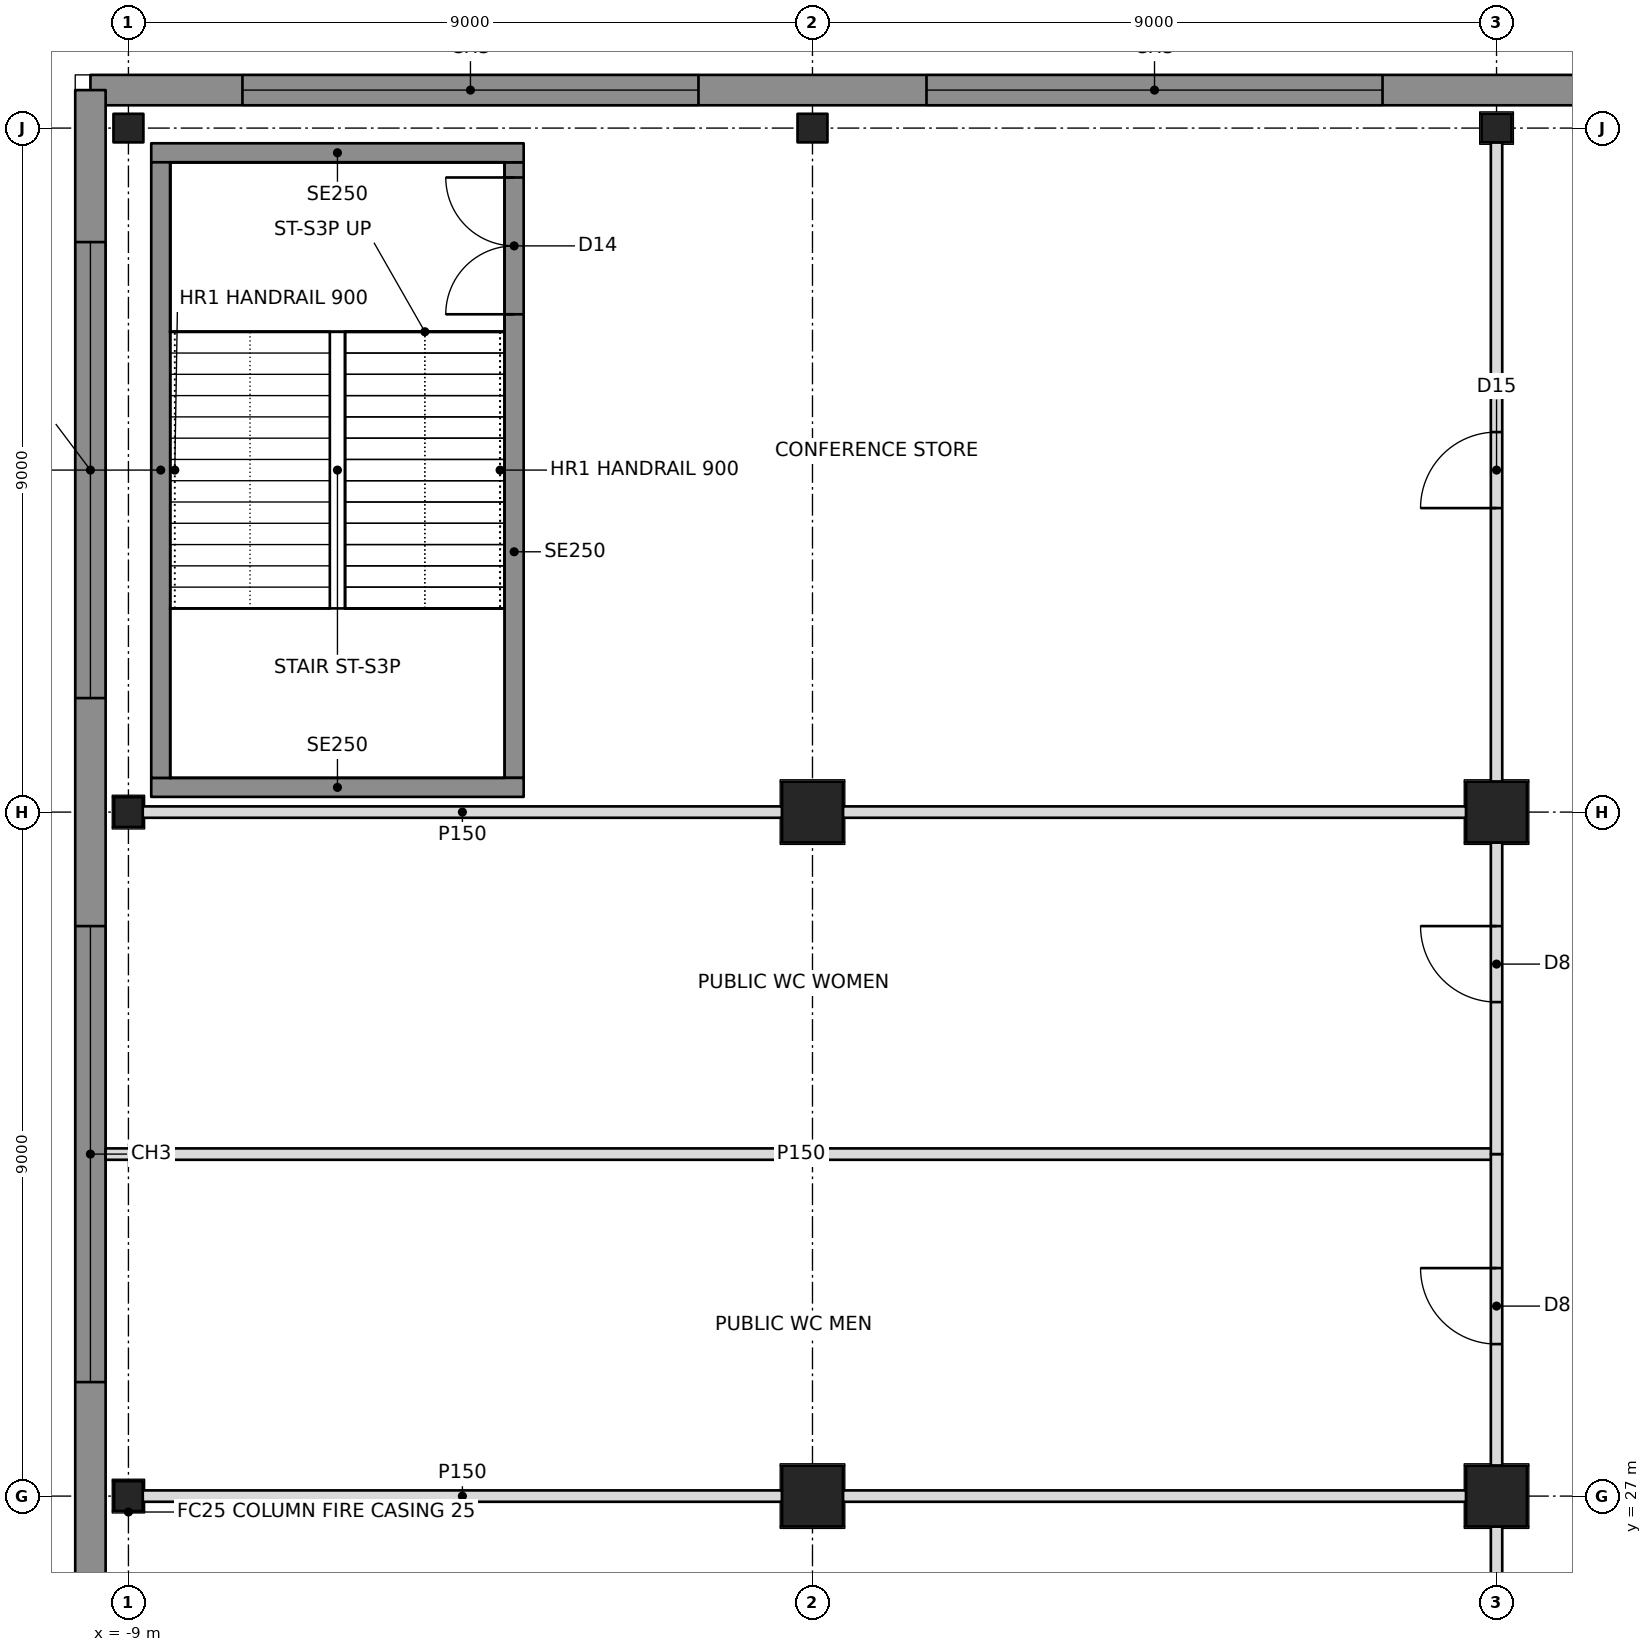
"""IFC4 building model, lengths in metres.
Left out: names, types, materials, properties, quantities, classifications, styles, units other than length and angle.
Written with IfcOpenShell. Run it as: python <this file> out.ifc"""

import sys

from ifc_helpers import new_model, si_unit, direction, frame, frame_2d, origin, origin_2d, place, context, subcontext, project, spatial, rectangle, hollow_rectangle, i_section, extrude, element, fill, save


model = new_model("IFC4")
c1 = context("Model", 3, precision=1e-05, world=origin(), true_north=direction((0.0, 1.0)))
c2 = subcontext(c1, "Body", "Model", "MODEL_VIEW")
j1 = project(units=[si_unit("LENGTHUNIT", "METRE"), si_unit("PLANEANGLEUNIT", "RADIAN")], contexts=[c1])
p1 = place(None, origin())
s1 = spatial("IfcSite", under=j1, at=p1, CompositionType="ELEMENT")
p2 = place(p1, origin())
s2 = spatial("IfcBuilding", under=s1, at=p2, CompositionType="ELEMENT")
p3 = place(p2, frame((0.0, 0.0, 16.0)))
s3 = spatial("IfcBuildingStorey", under=s2, at=p3, CompositionType="ELEMENT", Elevation=16.0)
for number, where, z_axis, x_axis in (
    (1, (-9.0, 27.0, 0.0), (0.0, 0.0, 1.0), (0.0, 1.0, 0.0)),
    (2, (-9.0, 36.0, 0.0), (0.0, 0.0, 1.0), (0.0, 1.0, 0.0)),
    (3, (-9.0, 45.0, 0.0), (0.0, 0.0, 1.0), (1.0, 0.0, 0.0)),
):
    element("IfcColumn", number, at=place(p3, frame(where, z_axis=z_axis, x_axis=x_axis)), inside=s3, PredefinedType="COLUMN", context=c2, shape_type="SweptSolid", body=[
        extrude(i_section(OverallWidth=0.394, OverallDepth=0.376, WebThickness=0.017, FlangeThickness=0.028, at=origin_2d()), origin(), (0.0, 0.0, 1.0), 7.0),
    ])
for number, where, z_axis, x_axis in (
    (4, (0.0, 27.0, 0.0), (0.0, 0.0, 1.0), (0.0, 1.0, 0.0)),
    (5, (0.0, 36.0, 0.0), (0.0, 0.0, 1.0), (1.0, 0.0, 0.0)),
):
    element("IfcColumn", number, at=place(p3, frame(where, z_axis=z_axis, x_axis=x_axis)), inside=s3, PredefinedType="COLUMN", context=c2, shape_type="SweptSolid", body=[
        extrude(hollow_rectangle(XDim=0.8, YDim=0.8, WallThickness=0.1, at=origin_2d()), origin(), (0.0, 0.0, 1.0), 7.0),
    ])
p4 = place(p3, frame((0.0, 45.0, 0.0), z_axis=(0.0, 0.0, 1.0), x_axis=(1.0, 0.0, 0.0)))
e6 = element("IfcColumn", 6, at=p4, inside=s3, PredefinedType="COLUMN", context=c2, shape_type="SweptSolid", body=[
    extrude(i_section(OverallWidth=0.394, OverallDepth=0.376, WebThickness=0.017, FlangeThickness=0.028, at=origin_2d()), origin(), (0.0, 0.0, 1.0), 7.0),
])
for number, where, z_axis, x_axis in (
    (7, (9.0, 27.0, 0.0), (0.0, 0.0, 1.0), (1.0, 0.0, 0.0)),
    (8, (9.0, 36.0, 0.0), (0.0, 0.0, 1.0), (1.0, 0.0, 0.0)),
):
    element("IfcColumn", number, at=place(p3, frame(where, z_axis=z_axis, x_axis=x_axis)), inside=s3, PredefinedType="COLUMN", context=c2, shape_type="SweptSolid", body=[
        extrude(hollow_rectangle(XDim=0.8, YDim=0.8, WallThickness=0.1, at=origin_2d()), origin(), (0.0, 0.0, 1.0), 7.0),
    ])
p5 = place(p3, frame((9.0, 45.0, 0.0), z_axis=(0.0, 0.0, 1.0), x_axis=(1.0, 0.0, 0.0)))
e9 = element("IfcColumn", 9, at=p5, inside=s3, PredefinedType="COLUMN", context=c2, shape_type="SweptSolid", body=[
    extrude(i_section(OverallWidth=0.394, OverallDepth=0.376, WebThickness=0.017, FlangeThickness=0.028, at=origin_2d()), origin(), (0.0, 0.0, 1.0), 7.0),
])
p6 = place(p3, frame((63.5, 45.5, 0.0), z_axis=(0.0, 0.0, 1.0), x_axis=(-1.0, 0.0, 0.0)))
e10 = element("IfcWall", 10, at=p6, inside=s3, PredefinedType="SOLIDWALL", context=c2, shape_type="SweptSolid", body=[
    extrude(rectangle(XDim=73.0, YDim=0.4, at=frame_2d((36.5, 0.0))), origin(), (0.0, 0.0, 1.0), 6.7),
])
p7 = place(p6, frame((2.0, 0.0, 0.9)))
e11 = element("IfcOpeningElement", 11, at=p7, cuts=e10, PredefinedType="OPENING", context=c2, shape_type="SweptSolid", body=[
    extrude(rectangle(XDim=6.0, YDim=2.6, at=frame_2d((3.0, 1.3))), frame((0.0, 0.21, 0.0), z_axis=(0.0, -1.0, 0.0), x_axis=(1.0, 0.0, 0.0)), (0.0, 0.0, 1.0), 0.42),
])
p8 = place(p6, frame((11.0, 0.0, 0.9)))
e12 = element("IfcOpeningElement", 12, at=p8, cuts=e10, PredefinedType="OPENING", context=c2, shape_type="SweptSolid", body=[
    extrude(rectangle(XDim=6.0, YDim=2.6, at=frame_2d((3.0, 1.3))), frame((0.0, 0.21, 0.0), z_axis=(0.0, -1.0, 0.0), x_axis=(1.0, 0.0, 0.0)), (0.0, 0.0, 1.0), 0.42),
])
p9 = place(p6, frame((20.0, 0.0, 0.9)))
e13 = element("IfcOpeningElement", 13, at=p9, cuts=e10, PredefinedType="OPENING", context=c2, shape_type="SweptSolid", body=[
    extrude(rectangle(XDim=6.0, YDim=2.6, at=frame_2d((3.0, 1.3))), frame((0.0, 0.21, 0.0), z_axis=(0.0, -1.0, 0.0), x_axis=(1.0, 0.0, 0.0)), (0.0, 0.0, 1.0), 0.42),
])
p10 = place(p6, frame((29.0, 0.0, 0.9)))
e14 = element("IfcOpeningElement", 14, at=p10, cuts=e10, PredefinedType="OPENING", context=c2, shape_type="SweptSolid", body=[
    extrude(rectangle(XDim=6.0, YDim=2.6, at=frame_2d((3.0, 1.3))), frame((0.0, 0.21, 0.0), z_axis=(0.0, -1.0, 0.0), x_axis=(1.0, 0.0, 0.0)), (0.0, 0.0, 1.0), 0.42),
])
p11 = place(p6, frame((38.0, 0.0, 0.9)))
e15 = element("IfcOpeningElement", 15, at=p11, cuts=e10, PredefinedType="OPENING", context=c2, shape_type="SweptSolid", body=[
    extrude(rectangle(XDim=6.0, YDim=2.6, at=frame_2d((3.0, 1.3))), frame((0.0, 0.21, 0.0), z_axis=(0.0, -1.0, 0.0), x_axis=(1.0, 0.0, 0.0)), (0.0, 0.0, 1.0), 0.42),
])
p12 = place(p6, frame((47.0, 0.0, 0.9)))
e16 = element("IfcOpeningElement", 16, at=p12, cuts=e10, PredefinedType="OPENING", context=c2, shape_type="SweptSolid", body=[
    extrude(rectangle(XDim=6.0, YDim=2.6, at=frame_2d((3.0, 1.3))), frame((0.0, 0.21, 0.0), z_axis=(0.0, -1.0, 0.0), x_axis=(1.0, 0.0, 0.0)), (0.0, 0.0, 1.0), 0.42),
])
p13 = place(p6, frame((56.0, 0.0, 0.9)))
e17 = element("IfcOpeningElement", 17, at=p13, cuts=e10, PredefinedType="OPENING", context=c2, shape_type="SweptSolid", body=[
    extrude(rectangle(XDim=6.0, YDim=2.6, at=frame_2d((3.0, 1.3))), frame((0.0, 0.21, 0.0), z_axis=(0.0, -1.0, 0.0), x_axis=(1.0, 0.0, 0.0)), (0.0, 0.0, 1.0), 0.42),
])
p14 = place(p6, frame((65.0, 0.0, 0.9)))
e18 = element("IfcOpeningElement", 18, at=p14, cuts=e10, PredefinedType="OPENING", context=c2, shape_type="SweptSolid", body=[
    extrude(rectangle(XDim=6.0, YDim=2.6, at=frame_2d((3.0, 1.3))), frame((0.0, 0.21, 0.0), z_axis=(0.0, -1.0, 0.0), x_axis=(1.0, 0.0, 0.0)), (0.0, 0.0, 1.0), 0.42),
])
p15 = place(p3, frame((-9.5, 45.5, 0.0), z_axis=(0.0, 0.0, 1.0), x_axis=(0.0, -1.0, 0.0)))
e19 = element("IfcWall", 19, at=p15, inside=s3, PredefinedType="SOLIDWALL", context=c2, shape_type="SweptSolid", body=[
    extrude(rectangle(XDim=73.0, YDim=0.4, at=frame_2d((36.5, 0.0))), origin(), (0.0, 0.0, 1.0), 6.7),
])
p16 = place(p15, frame((2.0, 0.0, 0.9)))
e20 = element("IfcOpeningElement", 20, at=p16, cuts=e19, PredefinedType="OPENING", context=c2, shape_type="SweptSolid", body=[
    extrude(rectangle(XDim=6.0, YDim=2.6, at=frame_2d((3.0, 1.3))), frame((0.0, 0.21, 0.0), z_axis=(0.0, -1.0, 0.0), x_axis=(1.0, 0.0, 0.0)), (0.0, 0.0, 1.0), 0.42),
])
p17 = place(p15, frame((11.0, 0.0, 0.9)))
e21 = element("IfcOpeningElement", 21, at=p17, cuts=e19, PredefinedType="OPENING", context=c2, shape_type="SweptSolid", body=[
    extrude(rectangle(XDim=6.0, YDim=2.6, at=frame_2d((3.0, 1.3))), frame((0.0, 0.21, 0.0), z_axis=(0.0, -1.0, 0.0), x_axis=(1.0, 0.0, 0.0)), (0.0, 0.0, 1.0), 0.42),
])
p18 = place(p15, frame((20.0, 0.0, 0.9)))
e22 = element("IfcOpeningElement", 22, at=p18, cuts=e19, PredefinedType="OPENING", context=c2, shape_type="SweptSolid", body=[
    extrude(rectangle(XDim=6.0, YDim=2.6, at=frame_2d((3.0, 1.3))), frame((0.0, 0.21, 0.0), z_axis=(0.0, -1.0, 0.0), x_axis=(1.0, 0.0, 0.0)), (0.0, 0.0, 1.0), 0.42),
])
p19 = place(p15, frame((29.0, 0.0, 0.9)))
e23 = element("IfcOpeningElement", 23, at=p19, cuts=e19, PredefinedType="OPENING", context=c2, shape_type="SweptSolid", body=[
    extrude(rectangle(XDim=6.0, YDim=2.6, at=frame_2d((3.0, 1.3))), frame((0.0, 0.21, 0.0), z_axis=(0.0, -1.0, 0.0), x_axis=(1.0, 0.0, 0.0)), (0.0, 0.0, 1.0), 0.42),
])
p20 = place(p15, frame((38.0, 0.0, 0.9)))
e24 = element("IfcOpeningElement", 24, at=p20, cuts=e19, PredefinedType="OPENING", context=c2, shape_type="SweptSolid", body=[
    extrude(rectangle(XDim=6.0, YDim=2.6, at=frame_2d((3.0, 1.3))), frame((0.0, 0.21, 0.0), z_axis=(0.0, -1.0, 0.0), x_axis=(1.0, 0.0, 0.0)), (0.0, 0.0, 1.0), 0.42),
])
p21 = place(p15, frame((47.0, 0.0, 0.9)))
e25 = element("IfcOpeningElement", 25, at=p21, cuts=e19, PredefinedType="OPENING", context=c2, shape_type="SweptSolid", body=[
    extrude(rectangle(XDim=6.0, YDim=2.6, at=frame_2d((3.0, 1.3))), frame((0.0, 0.21, 0.0), z_axis=(0.0, -1.0, 0.0), x_axis=(1.0, 0.0, 0.0)), (0.0, 0.0, 1.0), 0.42),
])
p22 = place(p15, frame((56.0, 0.0, 0.9)))
e26 = element("IfcOpeningElement", 26, at=p22, cuts=e19, PredefinedType="OPENING", context=c2, shape_type="SweptSolid", body=[
    extrude(rectangle(XDim=6.0, YDim=2.6, at=frame_2d((3.0, 1.3))), frame((0.0, 0.21, 0.0), z_axis=(0.0, -1.0, 0.0), x_axis=(1.0, 0.0, 0.0)), (0.0, 0.0, 1.0), 0.42),
])
p23 = place(p15, frame((65.0, 0.0, 0.9)))
e27 = element("IfcOpeningElement", 27, at=p23, cuts=e19, PredefinedType="OPENING", context=c2, shape_type="SweptSolid", body=[
    extrude(rectangle(XDim=6.0, YDim=2.6, at=frame_2d((3.0, 1.3))), frame((0.0, 0.21, 0.0), z_axis=(0.0, -1.0, 0.0), x_axis=(1.0, 0.0, 0.0)), (0.0, 0.0, 1.0), 0.42),
])
p24 = place(p3, frame((-8.812, 27.0, 0.0), z_axis=(0.0, 0.0, 1.0), x_axis=(1.0, 0.0, 0.0)))
e28 = element("IfcWall", 28, at=p24, inside=s3, PredefinedType="PARTITIONING", context=c2, shape_type="SweptSolid", body=[
    extrude(rectangle(XDim=8.412, YDim=0.15, at=frame_2d((4.206, 0.0))), origin(), (0.0, 0.0, 1.0), 5.753),
])
p25 = place(p3, frame((0.4, 27.0, 0.0), z_axis=(0.0, 0.0, 1.0), x_axis=(1.0, 0.0, 0.0)))
e29 = element("IfcWall", 29, at=p25, inside=s3, PredefinedType="PARTITIONING", context=c2, shape_type="SweptSolid", body=[
    extrude(rectangle(XDim=8.2, YDim=0.15, at=frame_2d((4.1, 0.0))), origin(), (0.0, 0.0, 1.0), 5.753),
])
p26 = place(p3, frame((-9.3, 31.5, 0.0), z_axis=(0.0, 0.0, 1.0), x_axis=(1.0, 0.0, 0.0)))
e30 = element("IfcWall", 30, at=p26, inside=s3, PredefinedType="PARTITIONING", context=c2, shape_type="SweptSolid", body=[
    extrude(rectangle(XDim=18.3, YDim=0.15, at=frame_2d((9.15, 0.0))), origin(), (0.0, 0.0, 1.0), 5.752),
])
p27 = place(p3, frame((-8.812, 36.0, 0.0), z_axis=(0.0, 0.0, 1.0), x_axis=(1.0, 0.0, 0.0)))
e31 = element("IfcWall", 31, at=p27, inside=s3, PredefinedType="PARTITIONING", context=c2, shape_type="SweptSolid", body=[
    extrude(rectangle(XDim=8.412, YDim=0.15, at=frame_2d((4.206, 0.0))), origin(), (0.0, 0.0, 1.0), 5.753),
])
p28 = place(p3, frame((0.4, 36.0, 0.0), z_axis=(0.0, 0.0, 1.0), x_axis=(1.0, 0.0, 0.0)))
e32 = element("IfcWall", 32, at=p28, inside=s3, PredefinedType="PARTITIONING", context=c2, shape_type="SweptSolid", body=[
    extrude(rectangle(XDim=8.2, YDim=0.15, at=frame_2d((4.1, 0.0))), origin(), (0.0, 0.0, 1.0), 5.753),
])
p29 = place(p3, frame((9.0, 26.6, 0.0), z_axis=(0.0, 0.0, 1.0), x_axis=(0.0, -1.0, 0.0)))
e33 = element("IfcWall", 33, at=p29, inside=s3, PredefinedType="PARTITIONING", context=c2, shape_type="SweptSolid", body=[
    extrude(rectangle(XDim=8.2, YDim=0.15, at=frame_2d((4.1, 0.0))), origin(), (0.0, 0.0, 1.0), 5.753),
])
p30 = place(p29, frame((6.6, 0.0, 0.0)))
e34 = element("IfcOpeningElement", 34, at=p30, cuts=e33, PredefinedType="OPENING", context=c2, shape_type="SweptSolid", body=[
    extrude(rectangle(XDim=1.0, YDim=2.1, at=frame_2d((0.5, 1.05))), frame((0.0, 0.085, 0.0), z_axis=(0.0, -1.0, 0.0), x_axis=(1.0, 0.0, 0.0)), (0.0, 0.0, 1.0), 0.17),
])
p31 = place(p3, frame((9.0, 31.5, 0.0), z_axis=(0.0, 0.0, 1.0), x_axis=(0.0, -1.0, 0.0)))
e35 = element("IfcWall", 35, at=p31, inside=s3, PredefinedType="PARTITIONING", context=c2, shape_type="SweptSolid", body=[
    extrude(rectangle(XDim=4.1, YDim=0.15, at=frame_2d((2.05, 0.0))), origin(), (0.0, 0.0, 1.0), 5.753),
])
p32 = place(p31, frame((1.5, 0.0, 0.0)))
e36 = element("IfcOpeningElement", 36, at=p32, cuts=e35, PredefinedType="OPENING", context=c2, shape_type="SweptSolid", body=[
    extrude(rectangle(XDim=1.0, YDim=2.1, at=frame_2d((0.5, 1.05))), frame((0.0, 0.085, 0.0), z_axis=(0.0, -1.0, 0.0), x_axis=(1.0, 0.0, 0.0)), (0.0, 0.0, 1.0), 0.17),
])
p33 = place(p3, frame((9.0, 35.6, 0.0), z_axis=(0.0, 0.0, 1.0), x_axis=(0.0, -1.0, 0.0)))
e37 = element("IfcWall", 37, at=p33, inside=s3, PredefinedType="PARTITIONING", context=c2, shape_type="SweptSolid", body=[
    extrude(rectangle(XDim=4.1, YDim=0.15, at=frame_2d((2.05, 0.0))), origin(), (0.0, 0.0, 1.0), 5.753),
])
p34 = place(p33, frame((1.1, 0.0, 0.0)))
e38 = element("IfcOpeningElement", 38, at=p34, cuts=e37, PredefinedType="OPENING", context=c2, shape_type="SweptSolid", body=[
    extrude(rectangle(XDim=1.0, YDim=2.1, at=frame_2d((0.5, 1.05))), frame((0.0, 0.085, 0.0), z_axis=(0.0, -1.0, 0.0), x_axis=(1.0, 0.0, 0.0)), (0.0, 0.0, 1.0), 0.17),
])
p35 = place(p3, frame((9.0, 44.812, 0.0), z_axis=(0.0, 0.0, 1.0), x_axis=(0.0, -1.0, 0.0)))
e39 = element("IfcWall", 39, at=p35, inside=s3, PredefinedType="PARTITIONING", context=c2, shape_type="SweptSolid", body=[
    extrude(rectangle(XDim=8.412, YDim=0.15, at=frame_2d((4.206, 0.0))), origin(), (0.0, 0.0, 1.0), 5.753),
])
p36 = place(p35, frame((3.812, 0.0, 0.0)))
e40 = element("IfcOpeningElement", 40, at=p36, cuts=e39, PredefinedType="OPENING", context=c2, shape_type="SweptSolid", body=[
    extrude(rectangle(XDim=1.0, YDim=2.1, at=frame_2d((0.5, 1.05))), frame((0.0, 0.085, 0.0), z_axis=(0.0, -1.0, 0.0), x_axis=(1.0, 0.0, 0.0)), (0.0, 0.0, 1.0), 0.17),
])
for number, where, z_axis, x_axis in (
    (41, (-8.7, 36.325, 0.0), (0.0, 0.0, 1.0), (1.0, 0.0, 0.0)),
    (42, (-8.7, 44.675, 0.0), (0.0, 0.0, 1.0), (1.0, 0.0, 0.0)),
):
    element("IfcWall", number, at=place(p3, frame(where, z_axis=z_axis, x_axis=x_axis)), inside=s3, PredefinedType="SOLIDWALL", context=c2, shape_type="SweptSolid", body=[
        extrude(rectangle(XDim=4.9, YDim=0.25, at=frame_2d((2.45, 0.0))), origin(), (0.0, 0.0, 1.0), 6.7),
    ])
p37 = place(p3, frame((-8.575, 36.45, 0.0), z_axis=(0.0, 0.0, 1.0), x_axis=(0.0, 1.0, 0.0)))
e43 = element("IfcWall", 43, at=p37, inside=s3, PredefinedType="SOLIDWALL", context=c2, shape_type="SweptSolid", body=[
    extrude(rectangle(XDim=8.1, YDim=0.25, at=frame_2d((4.05, 0.0))), origin(), (0.0, 0.0, 1.0), 6.7),
])
p38 = place(p3, frame((-3.925, 36.45, 0.0), z_axis=(0.0, 0.0, 1.0), x_axis=(0.0, 1.0, 0.0)))
e44 = element("IfcWall", 44, at=p38, inside=s3, PredefinedType="SOLIDWALL", context=c2, shape_type="SweptSolid", body=[
    extrude(rectangle(XDim=8.1, YDim=0.25, at=frame_2d((4.05, 0.0))), origin(), (0.0, 0.0, 1.0), 6.7),
])
p39 = place(p38, frame((6.1, 0.0, 0.0)))
e45 = element("IfcOpeningElement", 45, at=p39, cuts=e44, PredefinedType="OPENING", context=c2, shape_type="SweptSolid", body=[
    extrude(rectangle(XDim=1.8, YDim=2.1, at=frame_2d((0.9, 1.05))), frame((0.0, 0.135, 0.0), z_axis=(0.0, -1.0, 0.0), x_axis=(1.0, 0.0, 0.0)), (0.0, 0.0, 1.0), 0.27),
])
p40 = place(p13, origin())
e46 = element("IfcWindow", 46, at=p40, inside=s3, PartitioningType="TRIPLE_PANEL_VERTICAL", PredefinedType="WINDOW", context=c2, shape_type="SweptSolid", body=[
    extrude(rectangle(XDim=6.0, YDim=2.6, at=frame_2d((3.0, 1.3))), frame((0.0, 0.03, 0.0), z_axis=(0.0, -1.0, 0.0), x_axis=(1.0, 0.0, 0.0)), (0.0, 0.0, 1.0), 0.06),
])
fill(e17, e46)
p41 = place(p14, origin())
e47 = element("IfcWindow", 47, at=p41, inside=s3, PartitioningType="TRIPLE_PANEL_VERTICAL", PredefinedType="WINDOW", context=c2, shape_type="SweptSolid", body=[
    extrude(rectangle(XDim=6.0, YDim=2.6, at=frame_2d((3.0, 1.3))), frame((0.0, 0.03, 0.0), z_axis=(0.0, -1.0, 0.0), x_axis=(1.0, 0.0, 0.0)), (0.0, 0.0, 1.0), 0.06),
])
fill(e18, e47)
p42 = place(p16, origin())
e48 = element("IfcWindow", 48, at=p42, inside=s3, PartitioningType="TRIPLE_PANEL_VERTICAL", PredefinedType="WINDOW", context=c2, shape_type="SweptSolid", body=[
    extrude(rectangle(XDim=6.0, YDim=2.6, at=frame_2d((3.0, 1.3))), frame((0.0, 0.03, 0.0), z_axis=(0.0, -1.0, 0.0), x_axis=(1.0, 0.0, 0.0)), (0.0, 0.0, 1.0), 0.06),
])
fill(e20, e48)
p43 = place(p17, origin())
e49 = element("IfcWindow", 49, at=p43, inside=s3, PartitioningType="TRIPLE_PANEL_VERTICAL", PredefinedType="WINDOW", context=c2, shape_type="SweptSolid", body=[
    extrude(rectangle(XDim=6.0, YDim=2.6, at=frame_2d((3.0, 1.3))), frame((0.0, 0.03, 0.0), z_axis=(0.0, -1.0, 0.0), x_axis=(1.0, 0.0, 0.0)), (0.0, 0.0, 1.0), 0.06),
])
fill(e21, e49)
p44 = place(p32, frame((1.0, 0.0, 0.0), z_axis=(0.0, 0.0, 1.0), x_axis=(-1.0, 0.0, 0.0)))
e50 = element("IfcDoor", 50, at=p44, inside=s3, OperationType="SINGLE_SWING_RIGHT", PredefinedType="DOOR", context=c2, shape_type="SweptSolid", body=[
    extrude(rectangle(XDim=1.0, YDim=2.1, at=frame_2d((0.5, 1.05))), frame((0.0, 0.025, 0.0), z_axis=(0.0, -1.0, 0.0), x_axis=(1.0, 0.0, 0.0)), (0.0, 0.0, 1.0), 0.05),
])
fill(e36, e50)
p45 = place(p34, frame((1.0, 0.0, 0.0), z_axis=(0.0, 0.0, 1.0), x_axis=(-1.0, 0.0, 0.0)))
e51 = element("IfcDoor", 51, at=p45, inside=s3, OperationType="SINGLE_SWING_RIGHT", PredefinedType="DOOR", context=c2, shape_type="SweptSolid", body=[
    extrude(rectangle(XDim=1.0, YDim=2.1, at=frame_2d((0.5, 1.05))), frame((0.0, 0.025, 0.0), z_axis=(0.0, -1.0, 0.0), x_axis=(1.0, 0.0, 0.0)), (0.0, 0.0, 1.0), 0.05),
])
fill(e38, e51)
p46 = place(p36, frame((1.0, 0.0, 0.0), z_axis=(0.0, 0.0, 1.0), x_axis=(-1.0, 0.0, 0.0)))
e52 = element("IfcDoor", 52, at=p46, inside=s3, OperationType="SINGLE_SWING_LEFT", PredefinedType="DOOR", context=c2, shape_type="SweptSolid", body=[
    extrude(rectangle(XDim=1.0, YDim=2.1, at=frame_2d((0.5, 1.05))), frame((0.0, 0.025, 0.0), z_axis=(0.0, -1.0, 0.0), x_axis=(1.0, 0.0, 0.0)), (0.0, 0.0, 1.0), 0.05),
])
fill(e40, e52)
p47 = place(p39, origin())
e53 = element("IfcDoor", 53, at=p47, inside=s3, OperationType="DOUBLE_DOOR_SINGLE_SWING", PredefinedType="DOOR", context=c2, shape_type="SweptSolid", body=[
    extrude(rectangle(XDim=1.8, YDim=2.1, at=frame_2d((0.9, 1.05))), frame((0.0, 0.025, 0.0), z_axis=(0.0, -1.0, 0.0), x_axis=(1.0, 0.0, 0.0)), (0.0, 0.0, 1.0), 0.05),
])
fill(e45, e53)
save(model, sys.argv[1])
